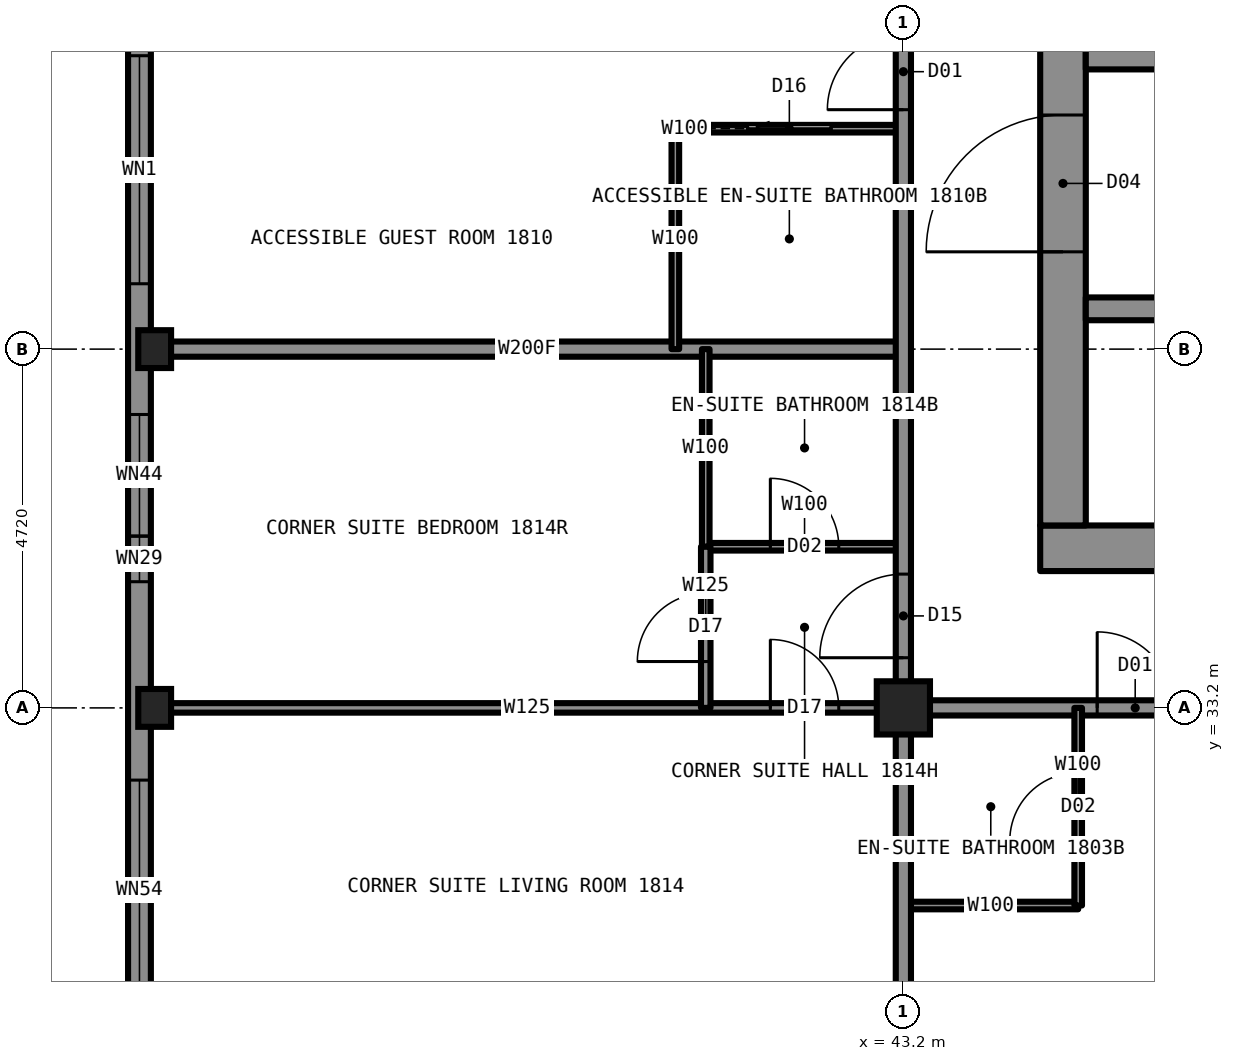
"""IFC4 building model, lengths in metres.
Left out: names, types, materials, properties, quantities, classifications, styles, units other than length and angle.
Written with IfcOpenShell. Run it as: python <this file> out.ifc"""

import sys

from ifc_helpers import new_model, si_unit, direction, frame, frame_2d, origin, origin_2d, place, context, subcontext, project, spatial, rectangle, hollow_rectangle, i_section, extrude, element, fill, save


model = new_model("IFC4")
c1 = context("Model", 3, precision=1e-05, world=origin(), true_north=direction((0.0, 1.0)))
c2 = subcontext(c1, "Body", "Model", "MODEL_VIEW")
j1 = project(units=[si_unit("LENGTHUNIT", "METRE"), si_unit("PLANEANGLEUNIT", "RADIAN")], contexts=[c1])
p1 = place(None, origin())
s1 = spatial("IfcSite", under=j1, at=p1, CompositionType="ELEMENT")
p2 = place(p1, origin())
s2 = spatial("IfcBuilding", under=s1, at=p2, CompositionType="ELEMENT")
p3 = place(p2, frame((0.0, 0.0, 70.5)))
s3 = spatial("IfcBuildingStorey", under=s2, at=p3, CompositionType="ELEMENT", Elevation=70.5)
for number, where, z_axis, x_axis in (
    (1, (33.35, 33.2, 0.0), (0.0, 0.0, 1.0), (1.0, 0.0, 0.0)),
    (2, (33.35, 37.92, 0.0), (0.0, 0.0, 1.0), (1.0, 0.0, 0.0)),
):
    element("IfcColumn", number, at=place(p3, frame(where, z_axis=z_axis, x_axis=x_axis)), inside=s3, PredefinedType="COLUMN", context=c2, shape_type="SweptSolid", body=[
        extrude(i_section(OverallWidth=0.432, OverallDepth=0.498, WebThickness=0.056, FlangeThickness=0.089, at=origin_2d()), origin(), (0.0, 0.0, 1.0), 3.5),
    ])
p4 = place(p3, frame((43.2, 33.2, 0.0), z_axis=(0.0, 0.0, 1.0), x_axis=(1.0, 0.0, 0.0)))
e3 = element("IfcColumn", 3, at=p4, inside=s3, PredefinedType="COLUMN", context=c2, shape_type="SweptSolid", body=[
    extrude(hollow_rectangle(XDim=0.7, YDim=0.7, WallThickness=0.06, at=origin_2d()), origin(), (0.0, 0.0, 1.0), 3.5),
])
p5 = place(p3, frame((45.0, 35.3, 0.0), z_axis=(0.0, 0.0, 1.0), x_axis=(1.0, 0.0, 0.0)))
e4 = element("IfcWall", 4, at=p5, inside=s3, PredefinedType="SHEAR", context=c2, shape_type="SweptSolid", body=[
    extrude(rectangle(XDim=20.0, YDim=0.6, at=frame_2d((10.0, 0.0))), origin(), (0.0, 0.0, 1.0), 3.5),
])
p6 = place(p3, frame((45.3, 35.6, 0.0), z_axis=(0.0, 0.0, 1.0), x_axis=(0.0, 1.0, 0.0)))
e5 = element("IfcWall", 5, at=p6, inside=s3, PredefinedType="SHEAR", context=c2, shape_type="SweptSolid", body=[
    extrude(rectangle(XDim=18.8, YDim=0.6, at=frame_2d((9.4, 0.0))), origin(), (0.0, 0.0, 1.0), 3.5),
])
p7 = place(p6, frame((13.4, 0.0, 0.0)))
e6 = element("IfcOpeningElement", 6, at=p7, cuts=e5, PredefinedType="OPENING", context=c2, shape_type="SweptSolid", body=[
    extrude(rectangle(XDim=1.8, YDim=2.2, at=frame_2d((0.9, 1.1))), frame((0.0, 0.31, 0.0), z_axis=(0.0, -1.0, 0.0), x_axis=(1.0, 0.0, 0.0)), (0.0, 0.0, 1.0), 0.62),
])
p8 = place(p6, frame((3.6, 0.0, 0.0)))
e7 = element("IfcOpeningElement", 7, at=p8, cuts=e5, PredefinedType="OPENING", context=c2, shape_type="SweptSolid", body=[
    extrude(rectangle(XDim=1.8, YDim=2.2, at=frame_2d((0.9, 1.1))), frame((0.0, 0.31, 0.0), z_axis=(0.0, -1.0, 0.0), x_axis=(1.0, 0.0, 0.0)), (0.0, 0.0, 1.0), 0.62),
])
p9 = place(p6, frame((6.4, 0.0, 0.0)))
e8 = element("IfcOpeningElement", 8, at=p9, cuts=e5, PredefinedType="OPENING", context=c2, shape_type="SweptSolid", body=[
    extrude(rectangle(XDim=1.2, YDim=2.2, at=frame_2d((0.6, 1.1))), frame((0.0, 0.31, 0.0), z_axis=(0.0, -1.0, 0.0), x_axis=(1.0, 0.0, 0.0)), (0.0, 0.0, 1.0), 0.62),
])
p10 = place(p3, frame((45.6, 38.45, 0.0), z_axis=(0.0, 0.0, 1.0), x_axis=(1.0, 0.0, 0.0)))
e9 = element("IfcWall", 9, at=p10, inside=s3, PredefinedType="SHEAR", context=c2, shape_type="SweptSolid", body=[
    extrude(rectangle(XDim=18.8, YDim=0.3, at=frame_2d((9.4, 0.0))), origin(), (0.0, 0.0, 1.0), 3.5),
])
p11 = place(p3, frame((45.6, 41.75, 0.0), z_axis=(0.0, 0.0, 1.0), x_axis=(1.0, 0.0, 0.0)))
e10 = element("IfcWall", 10, at=p11, inside=s3, PredefinedType="SHEAR", context=c2, shape_type="SweptSolid", body=[
    extrude(rectangle(XDim=7.1, YDim=0.3, at=frame_2d((3.55, 0.0))), origin(), (0.0, 0.0, 1.0), 3.5),
])
p12 = place(p3, frame((43.2, 33.2, 0.0), z_axis=(0.0, 0.0, 1.0), x_axis=(1.0, 0.0, 0.0)))
e11 = element("IfcWall", 11, at=p12, inside=s3, PredefinedType="PARTITIONING", context=c2, shape_type="SweptSolid", body=[
    extrude(rectangle(XDim=23.6, YDim=0.2, at=frame_2d((11.8, 0.0))), origin(), (0.0, 0.0, 1.0), 3.33),
])
p13 = place(p12, frame((2.55, 0.0, 0.0)))
e12 = element("IfcOpeningElement", 12, at=p13, cuts=e11, PredefinedType="OPENING", context=c2, shape_type="SweptSolid", body=[
    extrude(rectangle(XDim=1.0, YDim=2.2, at=frame_2d((0.5, 1.1))), frame((0.0, 0.11, 0.0), z_axis=(0.0, -1.0, 0.0), x_axis=(1.0, 0.0, 0.0)), (0.0, 0.0, 1.0), 0.22),
])
p14 = place(p12, frame((5.12, 0.0, 0.0)))
e13 = element("IfcOpeningElement", 13, at=p14, cuts=e11, PredefinedType="OPENING", context=c2, shape_type="SweptSolid", body=[
    extrude(rectangle(XDim=1.0, YDim=2.2, at=frame_2d((0.5, 1.1))), frame((0.0, 0.11, 0.0), z_axis=(0.0, -1.0, 0.0), x_axis=(1.0, 0.0, 0.0)), (0.0, 0.0, 1.0), 0.22),
])
p15 = place(p12, frame((11.7, 0.0, 0.0)))
e14 = element("IfcOpeningElement", 14, at=p15, cuts=e11, PredefinedType="OPENING", context=c2, shape_type="SweptSolid", body=[
    extrude(rectangle(XDim=1.0, YDim=2.2, at=frame_2d((0.5, 1.1))), frame((0.0, 0.11, 0.0), z_axis=(0.0, -1.0, 0.0), x_axis=(1.0, 0.0, 0.0)), (0.0, 0.0, 1.0), 0.22),
])
p16 = place(p12, frame((16.42, 0.0, 0.0)))
e15 = element("IfcOpeningElement", 15, at=p16, cuts=e11, PredefinedType="OPENING", context=c2, shape_type="SweptSolid", body=[
    extrude(rectangle(XDim=1.0, YDim=2.2, at=frame_2d((0.5, 1.1))), frame((0.0, 0.11, 0.0), z_axis=(0.0, -1.0, 0.0), x_axis=(1.0, 0.0, 0.0)), (0.0, 0.0, 1.0), 0.22),
])
p17 = place(p12, frame((21.43, 0.0, 0.0)))
e16 = element("IfcOpeningElement", 16, at=p17, cuts=e11, PredefinedType="OPENING", context=c2, shape_type="SweptSolid", body=[
    extrude(rectangle(XDim=1.0, YDim=2.2, at=frame_2d((0.5, 1.1))), frame((0.0, 0.11, 0.0), z_axis=(0.0, -1.0, 0.0), x_axis=(1.0, 0.0, 0.0)), (0.0, 0.0, 1.0), 0.22),
])
p18 = place(p3, frame((33.3, 33.2, 0.0), z_axis=(0.0, 0.0, 1.0), x_axis=(1.0, 0.0, 0.0)))
e17 = element("IfcWall", 17, at=p18, inside=s3, PredefinedType="PARTITIONING", context=c2, shape_type="SweptSolid", body=[
    extrude(rectangle(XDim=9.9, YDim=0.125, at=frame_2d((4.95, 0.0))), origin(), (0.0, 0.0, 1.0), 2.573),
])
p19 = place(p18, frame((8.15, 0.0, 0.0)))
e18 = element("IfcOpeningElement", 18, at=p19, cuts=e17, PredefinedType="OPENING", context=c2, shape_type="SweptSolid", body=[
    extrude(rectangle(XDim=0.9, YDim=2.2, at=frame_2d((0.45, 1.1))), frame((0.0, 0.073, 0.0), z_axis=(0.0, -1.0, 0.0), x_axis=(1.0, 0.0, 0.0)), (0.0, 0.0, 1.0), 0.145),
])
p20 = place(p3, frame((43.2, 30.6, 0.0), z_axis=(0.0, 0.0, 1.0), x_axis=(1.0, 0.0, 0.0)))
e19 = element("IfcWall", 19, at=p20, inside=s3, PredefinedType="PARTITIONING", context=c2, shape_type="SweptSolid", body=[
    extrude(rectangle(XDim=2.3, YDim=0.1, at=frame_2d((1.15, 0.0))), origin(), (0.0, 0.0, 1.0), 3.33),
])
p21 = place(p3, frame((40.2, 40.82, 0.0), z_axis=(0.0, 0.0, 1.0), x_axis=(1.0, 0.0, 0.0)))
e20 = element("IfcWall", 20, at=p21, inside=s3, PredefinedType="PARTITIONING", context=c2, shape_type="SweptSolid", body=[
    extrude(rectangle(XDim=3.0, YDim=0.1, at=frame_2d((1.5, 0.0))), origin(), (0.0, 0.0, 1.0), 3.33),
])
p22 = place(p21, frame((0.95, 0.0, 0.0)))
e21 = element("IfcOpeningElement", 21, at=p22, cuts=e20, PredefinedType="OPENING", context=c2, shape_type="SweptSolid", body=[
    extrude(rectangle(XDim=1.1, YDim=2.1, at=frame_2d((0.55, 1.05))), frame((0.0, 0.06, 0.0), z_axis=(0.0, -1.0, 0.0), x_axis=(1.0, 0.0, 0.0)), (0.0, 0.0, 1.0), 0.12),
])
p23 = place(p3, frame((33.3, 37.92, 0.0), z_axis=(0.0, 0.0, 1.0), x_axis=(1.0, 0.0, 0.0)))
e22 = element("IfcWall", 22, at=p23, inside=s3, PredefinedType="PARTITIONING", context=c2, shape_type="SweptSolid", body=[
    extrude(rectangle(XDim=9.9, YDim=0.2, at=frame_2d((4.95, 0.0))), origin(), (0.0, 0.0, 1.0), 2.573),
])
p24 = place(p3, frame((40.6, 35.32, 0.0), z_axis=(0.0, 0.0, 1.0), x_axis=(1.0, 0.0, 0.0)))
e23 = element("IfcWall", 23, at=p24, inside=s3, PredefinedType="PARTITIONING", context=c2, shape_type="SweptSolid", body=[
    extrude(rectangle(XDim=2.6, YDim=0.1, at=frame_2d((1.3, 0.0))), origin(), (0.0, 0.0, 1.0), 3.33),
])
p25 = place(p24, frame((0.85, 0.0, 0.0)))
e24 = element("IfcOpeningElement", 24, at=p25, cuts=e23, PredefinedType="OPENING", context=c2, shape_type="SweptSolid", body=[
    extrude(rectangle(XDim=0.9, YDim=2.1, at=frame_2d((0.45, 1.05))), frame((0.0, 0.06, 0.0), z_axis=(0.0, -1.0, 0.0), x_axis=(1.0, 0.0, 0.0)), (0.0, 0.0, 1.0), 0.12),
])
p26 = place(p3, frame((43.2, 33.2, 0.0), z_axis=(0.0, 0.0, 1.0), x_axis=(0.0, 1.0, 0.0)))
e25 = element("IfcWall", 25, at=p26, inside=s3, PredefinedType="PARTITIONING", context=c2, shape_type="SweptSolid", body=[
    extrude(rectangle(XDim=23.6, YDim=0.2, at=frame_2d((11.8, 0.0))), origin(), (0.0, 0.0, 1.0), 3.33),
])
p27 = place(p26, frame((7.87, 0.0, 0.0)))
e26 = element("IfcOpeningElement", 26, at=p27, cuts=e25, PredefinedType="OPENING", context=c2, shape_type="SweptSolid", body=[
    extrude(rectangle(XDim=1.0, YDim=2.2, at=frame_2d((0.5, 1.1))), frame((0.0, 0.11, 0.0), z_axis=(0.0, -1.0, 0.0), x_axis=(1.0, 0.0, 0.0)), (0.0, 0.0, 1.0), 0.22),
])
p28 = place(p26, frame((12.44, 0.0, 0.0)))
e27 = element("IfcOpeningElement", 27, at=p28, cuts=e25, PredefinedType="OPENING", context=c2, shape_type="SweptSolid", body=[
    extrude(rectangle(XDim=1.0, YDim=2.2, at=frame_2d((0.5, 1.1))), frame((0.0, 0.11, 0.0), z_axis=(0.0, -1.0, 0.0), x_axis=(1.0, 0.0, 0.0)), (0.0, 0.0, 1.0), 0.22),
])
p29 = place(p26, frame((21.85, 0.0, 0.0)))
e28 = element("IfcOpeningElement", 28, at=p29, cuts=e25, PredefinedType="OPENING", context=c2, shape_type="SweptSolid", body=[
    extrude(rectangle(XDim=1.1, YDim=2.2, at=frame_2d((0.55, 1.1))), frame((0.0, 0.11, 0.0), z_axis=(0.0, -1.0, 0.0), x_axis=(1.0, 0.0, 0.0)), (0.0, 0.0, 1.0), 0.22),
])
p30 = place(p26, frame((0.66, 0.0, 0.0)))
e29 = element("IfcOpeningElement", 29, at=p30, cuts=e25, PredefinedType="OPENING", context=c2, shape_type="SweptSolid", body=[
    extrude(rectangle(XDim=1.1, YDim=2.2, at=frame_2d((0.55, 1.1))), frame((0.0, 0.11, 0.0), z_axis=(0.0, -1.0, 0.0), x_axis=(1.0, 0.0, 0.0)), (0.0, 0.0, 1.0), 0.22),
])
p31 = place(p3, frame((43.2, 23.3, 0.0), z_axis=(0.0, 0.0, 1.0), x_axis=(0.0, 1.0, 0.0)))
e30 = element("IfcWall", 30, at=p31, inside=s3, PredefinedType="PARTITIONING", context=c2, shape_type="SweptSolid", body=[
    extrude(rectangle(XDim=9.9, YDim=0.2, at=frame_2d((4.95, 0.0))), origin(), (0.0, 0.0, 1.0), 2.573),
])
p32 = place(p3, frame((40.6, 35.32, 0.0), z_axis=(0.0, 0.0, 1.0), x_axis=(0.0, 1.0, 0.0)))
e31 = element("IfcWall", 31, at=p32, inside=s3, PredefinedType="PARTITIONING", context=c2, shape_type="SweptSolid", body=[
    extrude(rectangle(XDim=2.6, YDim=0.1, at=frame_2d((1.3, 0.0))), origin(), (0.0, 0.0, 1.0), 3.33),
])
p33 = place(p3, frame((40.6, 33.2, 0.0), z_axis=(0.0, 0.0, 1.0), x_axis=(0.0, 1.0, 0.0)))
e32 = element("IfcWall", 32, at=p33, inside=s3, PredefinedType="PARTITIONING", context=c2, shape_type="SweptSolid", body=[
    extrude(rectangle(XDim=2.12, YDim=0.125, at=frame_2d((1.06, 0.0))), origin(), (0.0, 0.0, 1.0), 3.33),
])
p34 = place(p33, frame((0.61, 0.0, 0.0)))
e33 = element("IfcOpeningElement", 33, at=p34, cuts=e32, PredefinedType="OPENING", context=c2, shape_type="SweptSolid", body=[
    extrude(rectangle(XDim=0.9, YDim=2.2, at=frame_2d((0.45, 1.1))), frame((0.0, 0.073, 0.0), z_axis=(0.0, -1.0, 0.0), x_axis=(1.0, 0.0, 0.0)), (0.0, 0.0, 1.0), 0.145),
])
p35 = place(p3, frame((40.2, 37.92, 0.0), z_axis=(0.0, 0.0, 1.0), x_axis=(0.0, 1.0, 0.0)))
e34 = element("IfcWall", 34, at=p35, inside=s3, PredefinedType="PARTITIONING", context=c2, shape_type="SweptSolid", body=[
    extrude(rectangle(XDim=2.9, YDim=0.1, at=frame_2d((1.45, 0.0))), origin(), (0.0, 0.0, 1.0), 3.33),
])
p36 = place(p3, frame((45.5, 30.6, 0.0), z_axis=(0.0, 0.0, 1.0), x_axis=(0.0, 1.0, 0.0)))
e35 = element("IfcWall", 35, at=p36, inside=s3, PredefinedType="PARTITIONING", context=c2, shape_type="SweptSolid", body=[
    extrude(rectangle(XDim=2.6, YDim=0.1, at=frame_2d((1.3, 0.0))), origin(), (0.0, 0.0, 1.0), 3.33),
])
p37 = place(p36, frame((0.85, 0.0, 0.0)))
e36 = element("IfcOpeningElement", 36, at=p37, cuts=e35, PredefinedType="OPENING", context=c2, shape_type="SweptSolid", body=[
    extrude(rectangle(XDim=0.9, YDim=2.1, at=frame_2d((0.45, 1.05))), frame((0.0, 0.06, 0.0), z_axis=(0.0, -1.0, 0.0), x_axis=(1.0, 0.0, 0.0)), (0.0, 0.0, 1.0), 0.12),
])
p38 = place(p3, frame((33.15, 61.5, 0.0), z_axis=(0.0, 0.0, 1.0), x_axis=(0.0, -1.0, 0.0)))
e37 = element("IfcWall", 37, at=p38, inside=s3, PredefinedType="SOLIDWALL", context=c2, shape_type="SweptSolid", body=[
    extrude(rectangle(XDim=33.0, YDim=0.3, at=frame_2d((16.5, 0.0))), origin(), (0.0, 0.0, 1.0), 2.83),
])
p39 = place(p38, frame((0.85, 0.0, 0.5)))
e38 = element("IfcOpeningElement", 38, at=p39, cuts=e37, PredefinedType="OPENING", context=c2, shape_type="SweptSolid", body=[
    extrude(rectangle(XDim=2.9, YDim=2.0, at=frame_2d((1.45, 1.0))), frame((0.0, 0.16, 0.0), z_axis=(0.0, -1.0, 0.0), x_axis=(1.0, 0.0, 0.0)), (0.0, 0.0, 1.0), 0.32),
])
p40 = place(p38, frame((6.96, 0.0, 0.55)))
e39 = element("IfcOpeningElement", 39, at=p40, cuts=e37, PredefinedType="OPENING", context=c2, shape_type="SweptSolid", body=[
    extrude(rectangle(XDim=1.6, YDim=1.9, at=frame_2d((0.8, 0.95))), frame((0.0, 0.16, 0.0), z_axis=(0.0, -1.0, 0.0), x_axis=(1.0, 0.0, 0.0)), (0.0, 0.0, 1.0), 0.32),
])
p41 = place(p38, frame((10.28, 0.0, 0.5)))
e40 = element("IfcOpeningElement", 40, at=p41, cuts=e37, PredefinedType="OPENING", context=c2, shape_type="SweptSolid", body=[
    extrude(rectangle(XDim=3.0, YDim=2.0, at=frame_2d((1.5, 1.0))), frame((0.0, 0.16, 0.0), z_axis=(0.0, -1.0, 0.0), x_axis=(1.0, 0.0, 0.0)), (0.0, 0.0, 1.0), 0.32),
])
p42 = place(p38, frame((15.0, 0.0, 0.5)))
e41 = element("IfcOpeningElement", 41, at=p42, cuts=e37, PredefinedType="OPENING", context=c2, shape_type="SweptSolid", body=[
    extrude(rectangle(XDim=3.0, YDim=2.0, at=frame_2d((1.5, 1.0))), frame((0.0, 0.16, 0.0), z_axis=(0.0, -1.0, 0.0), x_axis=(1.0, 0.0, 0.0)), (0.0, 0.0, 1.0), 0.32),
])
p43 = place(p38, frame((19.72, 0.0, 0.5)))
e42 = element("IfcOpeningElement", 42, at=p43, cuts=e37, PredefinedType="OPENING", context=c2, shape_type="SweptSolid", body=[
    extrude(rectangle(XDim=3.0, YDim=2.0, at=frame_2d((1.5, 1.0))), frame((0.0, 0.16, 0.0), z_axis=(0.0, -1.0, 0.0), x_axis=(1.0, 0.0, 0.0)), (0.0, 0.0, 1.0), 0.32),
])
p44 = place(p38, frame((24.44, 0.0, 0.55)))
e43 = element("IfcOpeningElement", 43, at=p44, cuts=e37, PredefinedType="OPENING", context=c2, shape_type="SweptSolid", body=[
    extrude(rectangle(XDim=1.6, YDim=1.9, at=frame_2d((0.8, 0.95))), frame((0.0, 0.16, 0.0), z_axis=(0.0, -1.0, 0.0), x_axis=(1.0, 0.0, 0.0)), (0.0, 0.0, 1.0), 0.32),
])
p45 = place(p38, frame((29.25, 0.0, 0.5)))
e44 = element("IfcOpeningElement", 44, at=p45, cuts=e37, PredefinedType="OPENING", context=c2, shape_type="SweptSolid", body=[
    extrude(rectangle(XDim=2.9, YDim=2.0, at=frame_2d((1.45, 1.0))), frame((0.0, 0.16, 0.0), z_axis=(0.0, -1.0, 0.0), x_axis=(1.0, 0.0, 0.0)), (0.0, 0.0, 1.0), 0.32),
])
p46 = place(p38, frame((6.31, 0.0, 1.45)))
e45 = element("IfcOpeningElement", 45, at=p46, cuts=e37, PredefinedType="OPENING", context=c2, shape_type="SweptSolid", body=[
    extrude(rectangle(XDim=0.6, YDim=1.0, at=frame_2d((0.3, 0.5))), frame((0.0, 0.16, 0.0), z_axis=(0.0, -1.0, 0.0), x_axis=(1.0, 0.0, 0.0)), (0.0, 0.0, 1.0), 0.32),
])
p47 = place(p38, frame((26.04, 0.0, 1.45)))
e46 = element("IfcOpeningElement", 46, at=p47, cuts=e37, PredefinedType="OPENING", context=c2, shape_type="SweptSolid", body=[
    extrude(rectangle(XDim=0.6, YDim=1.0, at=frame_2d((0.3, 0.5))), frame((0.0, 0.16, 0.0), z_axis=(0.0, -1.0, 0.0), x_axis=(1.0, 0.0, 0.0)), (0.0, 0.0, 1.0), 0.32),
])
p48 = place(p13, origin())
e47 = element("IfcDoor", 47, at=p48, inside=s3, OperationType="SINGLE_SWING_LEFT", PredefinedType="DOOR", context=c2, shape_type="SweptSolid", body=[
    extrude(rectangle(XDim=1.0, YDim=2.2, at=frame_2d((0.5, 1.1))), frame((0.0, 0.025, 0.0), z_axis=(0.0, -1.0, 0.0), x_axis=(1.0, 0.0, 0.0)), (0.0, 0.0, 1.0), 0.05),
])
fill(e12, e47)
p49 = place(p37, origin())
e48 = element("IfcDoor", 48, at=p49, inside=s3, OperationType="SINGLE_SWING_RIGHT", PredefinedType="DOOR", context=c2, shape_type="SweptSolid", body=[
    extrude(rectangle(XDim=0.9, YDim=2.1, at=frame_2d((0.45, 1.05))), frame((0.0, 0.025, 0.0), z_axis=(0.0, -1.0, 0.0), x_axis=(1.0, 0.0, 0.0)), (0.0, 0.0, 1.0), 0.05),
])
fill(e36, e48)
p50 = place(p27, origin())
e49 = element("IfcDoor", 49, at=p50, inside=s3, OperationType="SINGLE_SWING_LEFT", PredefinedType="DOOR", context=c2, shape_type="SweptSolid", body=[
    extrude(rectangle(XDim=1.0, YDim=2.2, at=frame_2d((0.5, 1.1))), frame((0.0, 0.025, 0.0), z_axis=(0.0, -1.0, 0.0), x_axis=(1.0, 0.0, 0.0)), (0.0, 0.0, 1.0), 0.05),
])
fill(e26, e49)
p51 = place(p22, origin())
e50 = element("IfcDoor", 50, at=p51, inside=s3, OperationType="SLIDING_TO_LEFT", PredefinedType="DOOR", context=c2, shape_type="SweptSolid", body=[
    extrude(rectangle(XDim=1.1, YDim=2.1, at=frame_2d((0.55, 1.05))), frame((0.0, 0.025, 0.0), z_axis=(0.0, -1.0, 0.0), x_axis=(1.0, 0.0, 0.0)), (0.0, 0.0, 1.0), 0.05),
])
fill(e21, e50)
p52 = place(p19, origin())
e51 = element("IfcDoor", 51, at=p52, inside=s3, OperationType="SINGLE_SWING_LEFT", PredefinedType="DOOR", context=c2, shape_type="SweptSolid", body=[
    extrude(rectangle(XDim=0.9, YDim=2.2, at=frame_2d((0.45, 1.1))), frame((0.0, 0.025, 0.0), z_axis=(0.0, -1.0, 0.0), x_axis=(1.0, 0.0, 0.0)), (0.0, 0.0, 1.0), 0.05),
])
fill(e18, e51)
p53 = place(p25, origin())
e52 = element("IfcDoor", 52, at=p53, inside=s3, OperationType="SINGLE_SWING_RIGHT", PredefinedType="DOOR", context=c2, shape_type="SweptSolid", body=[
    extrude(rectangle(XDim=0.9, YDim=2.1, at=frame_2d((0.45, 1.05))), frame((0.0, 0.025, 0.0), z_axis=(0.0, -1.0, 0.0), x_axis=(1.0, 0.0, 0.0)), (0.0, 0.0, 1.0), 0.05),
])
fill(e24, e52)
p54 = place(p30, origin())
e53 = element("IfcDoor", 53, at=p54, inside=s3, OperationType="SINGLE_SWING_LEFT", PredefinedType="DOOR", context=c2, shape_type="SweptSolid", body=[
    extrude(rectangle(XDim=1.1, YDim=2.2, at=frame_2d((0.55, 1.1))), frame((0.0, 0.025, 0.0), z_axis=(0.0, -1.0, 0.0), x_axis=(1.0, 0.0, 0.0)), (0.0, 0.0, 1.0), 0.05),
])
fill(e29, e53)
p55 = place(p34, origin())
e54 = element("IfcDoor", 54, at=p55, inside=s3, OperationType="SINGLE_SWING_LEFT", PredefinedType="DOOR", context=c2, shape_type="SweptSolid", body=[
    extrude(rectangle(XDim=0.9, YDim=2.2, at=frame_2d((0.45, 1.1))), frame((0.0, 0.025, 0.0), z_axis=(0.0, -1.0, 0.0), x_axis=(1.0, 0.0, 0.0)), (0.0, 0.0, 1.0), 0.05),
])
fill(e33, e54)
p56 = place(p43, origin())
e55 = element("IfcWindow", 55, at=p56, inside=s3, PartitioningType="SINGLE_PANEL", PredefinedType="WINDOW", context=c2, shape_type="SweptSolid", body=[
    extrude(rectangle(XDim=3.0, YDim=2.0, at=frame_2d((1.5, 1.0))), frame((0.0, 0.03, 0.0), z_axis=(0.0, -1.0, 0.0), x_axis=(1.0, 0.0, 0.0)), (0.0, 0.0, 1.0), 0.06),
])
fill(e42, e55)
p57 = place(p44, origin())
e56 = element("IfcWindow", 56, at=p57, inside=s3, PartitioningType="SINGLE_PANEL", PredefinedType="WINDOW", context=c2, shape_type="SweptSolid", body=[
    extrude(rectangle(XDim=1.6, YDim=1.9, at=frame_2d((0.8, 0.95))), frame((0.0, 0.03, 0.0), z_axis=(0.0, -1.0, 0.0), x_axis=(1.0, 0.0, 0.0)), (0.0, 0.0, 1.0), 0.06),
])
fill(e43, e56)
p58 = place(p45, origin())
e57 = element("IfcWindow", 57, at=p58, inside=s3, PartitioningType="SINGLE_PANEL", PredefinedType="WINDOW", context=c2, shape_type="SweptSolid", body=[
    extrude(rectangle(XDim=2.9, YDim=2.0, at=frame_2d((1.45, 1.0))), frame((0.0, 0.03, 0.0), z_axis=(0.0, -1.0, 0.0), x_axis=(1.0, 0.0, 0.0)), (0.0, 0.0, 1.0), 0.06),
])
fill(e44, e57)
p59 = place(p8, origin())
e58 = element("IfcDoor", 58, at=p59, inside=s3, OperationType="DOUBLE_DOOR_SINGLE_SWING", PredefinedType="DOOR", context=c2, shape_type="SweptSolid", body=[
    extrude(rectangle(XDim=1.8, YDim=2.2, at=frame_2d((0.9, 1.1))), frame((0.0, 0.025, 0.0), z_axis=(0.0, -1.0, 0.0), x_axis=(1.0, 0.0, 0.0)), (0.0, 0.0, 1.0), 0.05),
])
fill(e7, e58)
p60 = place(p47, origin())
e59 = element("IfcWindow", 59, at=p60, inside=s3, PartitioningType="SINGLE_PANEL", PredefinedType="WINDOW", context=c2, shape_type="SweptSolid", body=[
    extrude(rectangle(XDim=0.6, YDim=1.0, at=frame_2d((0.3, 0.5))), frame((0.0, 0.03, 0.0), z_axis=(0.0, -1.0, 0.0), x_axis=(1.0, 0.0, 0.0)), (0.0, 0.0, 1.0), 0.06),
])
fill(e46, e59)
save(model, sys.argv[1])
